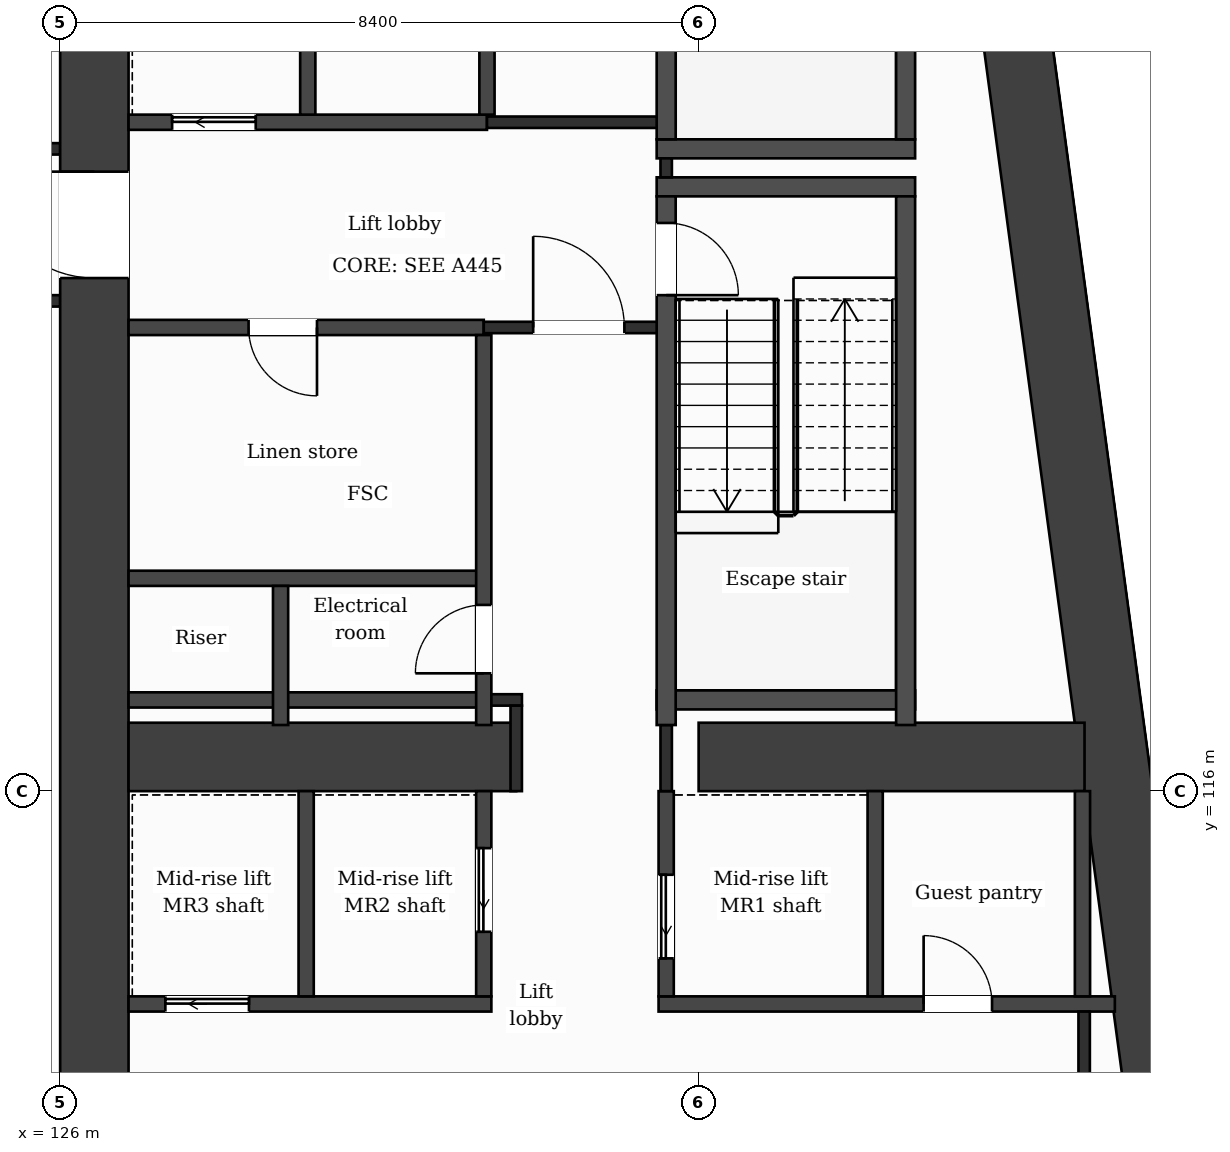
"""IFC4 building model, lengths in metres.
Left out: names, types, materials, properties, quantities, classifications, styles, units other than length and angle.
Written with IfcOpenShell. Run it as: python <this file> out.ifc"""

import sys

from ifc_helpers import new_model, si_unit, direction, frame, frame_2d, origin, place, context, subcontext, project, spatial, rectangle, extrude, element, fill, save


model = new_model("IFC4")
c1 = context("Model", 3, precision=1e-05, world=origin(), true_north=direction((0.0, 1.0)))
c2 = subcontext(c1, "Body", "Model", "MODEL_VIEW")
j1 = project(units=[si_unit("LENGTHUNIT", "METRE"), si_unit("PLANEANGLEUNIT", "RADIAN")], contexts=[c1])
p1 = place(None, origin())
s1 = spatial("IfcSite", under=j1, at=p1, CompositionType="ELEMENT")
p2 = place(p1, origin())
s2 = spatial("IfcBuilding", under=s1, at=p2, CompositionType="ELEMENT")
p3 = place(p2, frame((0.0, 0.0, 184.8)))
s3 = spatial("IfcBuildingStorey", under=s2, at=p3, CompositionType="ELEMENT", Elevation=184.8)
p4 = place(p3, frame((137.776, 131.95, 0.0), z_axis=(0.0, 0.0, 1.0), x_axis=(0.133421759112, -0.991059349482, 0.0)))
e1 = element("IfcWall", 1, at=p4, inside=s3, PredefinedType="SHEAR", context=c2, shape_type="SweptSolid", body=[
    extrude(rectangle(XDim=21.29, YDim=0.9, at=frame_2d((10.645, 0.0))), origin(), (0.0, 0.0, 1.0), 3.7),
])
p5 = place(p3, frame((126.45, 110.85, 0.0), z_axis=(0.0, 0.0, 1.0), x_axis=(0.0, 1.0, 0.0)))
e2 = element("IfcWall", 2, at=p5, inside=s3, PredefinedType="SHEAR", context=c2, shape_type="SweptSolid", body=[
    extrude(rectangle(XDim=21.1, YDim=0.9, at=frame_2d((10.55, 0.0))), origin(), (0.0, 0.0, 1.0), 3.7),
])
p6 = place(p5, frame((11.9, 0.0, 0.0)))
e3 = element("IfcOpeningElement", 3, at=p6, cuts=e2, PredefinedType="OPENING", context=c2, shape_type="SweptSolid", body=[
    extrude(rectangle(XDim=1.4, YDim=2.1, at=frame_2d((0.7, 1.05))), frame((0.0, 0.46, 0.0), z_axis=(0.0, -1.0, 0.0), x_axis=(1.0, 0.0, 0.0)), (0.0, 0.0, 1.0), 0.92),
])
p7 = place(p3, frame((126.9, 116.45, 0.0), z_axis=(0.0, 0.0, 1.0), x_axis=(1.0, 0.0, 0.0)))
e4 = element("IfcWall", 4, at=p7, inside=s3, PredefinedType="SHEAR", context=c2, shape_type="SweptSolid", body=[
    extrude(rectangle(XDim=5.1, YDim=0.9, at=frame_2d((2.55, 0.0))), origin(), (0.0, 0.0, 1.0), 3.7),
])
p8 = place(p3, frame((134.4, 116.45, 0.0), z_axis=(0.0, 0.0, 1.0), x_axis=(1.0, 0.0, 0.0)))
e5 = element("IfcWall", 5, at=p8, inside=s3, PredefinedType="SHEAR", context=c2, shape_type="SweptSolid", body=[
    extrude(rectangle(XDim=5.077, YDim=0.9, at=frame_2d((2.539, 0.0))), origin(), (0.0, 0.0, 1.0), 3.7),
])
p9 = place(p3, frame((126.9, 113.2, 0.0), z_axis=(0.0, 0.0, 1.0), x_axis=(1.0, 0.0, 0.0)))
e6 = element("IfcWall", 6, at=p9, inside=s3, PredefinedType="PARTITIONING", context=c2, shape_type="SweptSolid", body=[
    extrude(rectangle(XDim=4.773, YDim=0.2, at=frame_2d((2.387, 0.0))), origin(), (0.0, 0.0, 1.0), 3.38),
])
p10 = place(p9, frame((0.484, 0.0, 0.0)))
e7 = element("IfcOpeningElement", 7, at=p10, cuts=e6, PredefinedType="OPENING", context=c2, shape_type="SweptSolid", body=[
    extrude(rectangle(XDim=1.1, YDim=2.1, at=frame_2d((0.55, 1.05))), frame((0.0, 0.11, 0.0), z_axis=(0.0, -1.0, 0.0), x_axis=(1.0, 0.0, 0.0)), (0.0, 0.0, 1.0), 0.22),
])
p11 = place(p3, frame((133.873, 113.2, 0.0), z_axis=(0.0, 0.0, 1.0), x_axis=(1.0, 0.0, 0.0)))
e8 = element("IfcWall", 8, at=p11, inside=s3, PredefinedType="PARTITIONING", context=c2, shape_type="SweptSolid", body=[
    extrude(rectangle(XDim=6.003, YDim=0.2, at=frame_2d((3.001, 0.0))), origin(), (0.0, 0.0, 1.0), 3.38),
])
p12 = place(p11, frame((3.487, 0.0, 0.0)))
e9 = element("IfcOpeningElement", 9, at=p12, cuts=e8, PredefinedType="OPENING", context=c2, shape_type="SweptSolid", body=[
    extrude(rectangle(XDim=0.9, YDim=2.1, at=frame_2d((0.45, 1.05))), frame((0.0, 0.11, 0.0), z_axis=(0.0, -1.0, 0.0), x_axis=(1.0, 0.0, 0.0)), (0.0, 0.0, 1.0), 0.22),
])
p13 = place(p3, frame((126.9, 117.2, 0.0), z_axis=(0.0, 0.0, 1.0), x_axis=(1.0, 0.0, 0.0)))
e10 = element("IfcWall", 10, at=p13, inside=s3, PredefinedType="PARTITIONING", context=c2, shape_type="SweptSolid", body=[
    extrude(rectangle(XDim=4.673, YDim=0.2, at=frame_2d((2.336, 0.0))), origin(), (0.0, 0.0, 1.0), 3.38),
])
p14 = place(p3, frame((131.573, 117.2, 0.0), z_axis=(0.0, 0.0, 1.0), x_axis=(1.0, 0.0, 0.0)))
e11 = element("IfcWall", 11, at=p14, inside=s3, PredefinedType="PARTITIONING", context=c2, shape_type="SweptSolid", body=[
    extrude(rectangle(XDim=0.502, YDim=0.15, at=frame_2d((0.251, 0.0))), origin(), (0.0, 0.0, 1.0), 3.38),
])
p15 = place(p3, frame((133.848, 117.2, 0.0), z_axis=(0.0, 0.0, 1.0), x_axis=(1.0, 0.0, 0.0)))
e12 = element("IfcWall", 12, at=p15, inside=s3, PredefinedType="PARTITIONING", context=c2, shape_type="SweptSolid", body=[
    extrude(rectangle(XDim=3.4, YDim=0.25, at=frame_2d((1.7, 0.0))), origin(), (0.0, 0.0, 1.0), 3.38),
])
p16 = place(p3, frame((126.9, 118.8, 0.0), z_axis=(0.0, 0.0, 1.0), x_axis=(1.0, 0.0, 0.0)))
e13 = element("IfcWall", 13, at=p16, inside=s3, PredefinedType="PARTITIONING", context=c2, shape_type="SweptSolid", body=[
    extrude(rectangle(XDim=4.673, YDim=0.2, at=frame_2d((2.336, 0.0))), origin(), (0.0, 0.0, 1.0), 3.38),
])
p17 = place(p3, frame((126.9, 122.1, 0.0), z_axis=(0.0, 0.0, 1.0), x_axis=(1.0, 0.0, 0.0)))
e14 = element("IfcWall", 14, at=p17, inside=s3, PredefinedType="PARTITIONING", context=c2, shape_type="SweptSolid", body=[
    extrude(rectangle(XDim=4.673, YDim=0.2, at=frame_2d((2.336, 0.0))), origin(), (0.0, 0.0, 1.0), 3.38),
])
p18 = place(p17, frame((1.579, 0.0, 0.0)))
e15 = element("IfcOpeningElement", 15, at=p18, cuts=e14, PredefinedType="OPENING", context=c2, shape_type="SweptSolid", body=[
    extrude(rectangle(XDim=0.9, YDim=2.1, at=frame_2d((0.45, 1.05))), frame((0.0, 0.11, 0.0), z_axis=(0.0, -1.0, 0.0), x_axis=(1.0, 0.0, 0.0)), (0.0, 0.0, 1.0), 0.22),
])
p19 = place(p3, frame((131.573, 122.1, 0.0), z_axis=(0.0, 0.0, 1.0), x_axis=(1.0, 0.0, 0.0)))
e16 = element("IfcWall", 16, at=p19, inside=s3, PredefinedType="PARTITIONING", context=c2, shape_type="SweptSolid", body=[
    extrude(rectangle(XDim=2.4, YDim=0.15, at=frame_2d((1.2, 0.0))), origin(), (0.0, 0.0, 1.0), 3.38),
])
p20 = place(p19, frame((0.65, 0.0, 0.0)))
e17 = element("IfcOpeningElement", 17, at=p20, cuts=e16, PredefinedType="OPENING", context=c2, shape_type="SweptSolid", body=[
    extrude(rectangle(XDim=1.2, YDim=2.1, at=frame_2d((0.6, 1.05))), frame((0.0, 0.085, 0.0), z_axis=(0.0, -1.0, 0.0), x_axis=(1.0, 0.0, 0.0)), (0.0, 0.0, 1.0), 0.17),
])
p21 = place(p3, frame((100.8, 122.45, 0.0), z_axis=(0.0, 0.0, 1.0), x_axis=(1.0, 0.0, 0.0)))
e18 = element("IfcWall", 18, at=p21, inside=s3, PredefinedType="PARTITIONING", context=c2, shape_type="SweptSolid", body=[
    extrude(rectangle(XDim=25.2, YDim=0.15, at=frame_2d((12.6, 0.0))), origin(), (0.0, 0.0, 1.0), 3.38),
])
for number, where, z_axis, x_axis in (
    (19, (133.848, 123.95, 0.0), (0.0, 0.0, 1.0), (1.0, 0.0, 0.0)),
    (20, (133.848, 124.45, 0.0), (0.0, 0.0, 1.0), (1.0, 0.0, 0.0)),
):
    element("IfcWall", number, at=place(p3, frame(where, z_axis=z_axis, x_axis=x_axis)), inside=s3, PredefinedType="PARTITIONING", context=c2, shape_type="SweptSolid", body=[
        extrude(rectangle(XDim=3.4, YDim=0.25, at=frame_2d((1.7, 0.0))), origin(), (0.0, 0.0, 1.0), 3.38),
    ])
p22 = place(p3, frame((100.8, 124.45, 0.0), z_axis=(0.0, 0.0, 1.0), x_axis=(1.0, 0.0, 0.0)))
e21 = element("IfcWall", 21, at=p22, inside=s3, PredefinedType="PARTITIONING", context=c2, shape_type="SweptSolid", body=[
    extrude(rectangle(XDim=25.2, YDim=0.15, at=frame_2d((12.6, 0.0))), origin(), (0.0, 0.0, 1.0), 3.38),
])
p23 = place(p22, frame((0.675, 0.0, 0.0)))
e22 = element("IfcOpeningElement", 22, at=p23, cuts=e21, PredefinedType="OPENING", context=c2, shape_type="SweptSolid", body=[
    extrude(rectangle(XDim=1.0, YDim=2.1, at=frame_2d((0.5, 1.05))), frame((0.0, 0.085, 0.0), z_axis=(0.0, -1.0, 0.0), x_axis=(1.0, 0.0, 0.0)), (0.0, 0.0, 1.0), 0.17),
])
p24 = place(p22, frame((5.175, 0.0, 0.0)))
e23 = element("IfcOpeningElement", 23, at=p24, cuts=e21, PredefinedType="OPENING", context=c2, shape_type="SweptSolid", body=[
    extrude(rectangle(XDim=1.0, YDim=2.1, at=frame_2d((0.5, 1.05))), frame((0.0, 0.085, 0.0), z_axis=(0.0, -1.0, 0.0), x_axis=(1.0, 0.0, 0.0)), (0.0, 0.0, 1.0), 0.17),
])
p25 = place(p22, frame((10.425, 0.0, 0.0)))
e24 = element("IfcOpeningElement", 24, at=p25, cuts=e21, PredefinedType="OPENING", context=c2, shape_type="SweptSolid", body=[
    extrude(rectangle(XDim=1.0, YDim=2.1, at=frame_2d((0.5, 1.05))), frame((0.0, 0.085, 0.0), z_axis=(0.0, -1.0, 0.0), x_axis=(1.0, 0.0, 0.0)), (0.0, 0.0, 1.0), 0.17),
])
p26 = place(p22, frame((22.175, 0.0, 0.0)))
e25 = element("IfcOpeningElement", 25, at=p26, cuts=e21, PredefinedType="OPENING", context=c2, shape_type="SweptSolid", body=[
    extrude(rectangle(XDim=1.0, YDim=2.1, at=frame_2d((0.5, 1.05))), frame((0.0, 0.085, 0.0), z_axis=(0.0, -1.0, 0.0), x_axis=(1.0, 0.0, 0.0)), (0.0, 0.0, 1.0), 0.17),
])
p27 = place(p3, frame((126.9, 124.8, 0.0), z_axis=(0.0, 0.0, 1.0), x_axis=(1.0, 0.0, 0.0)))
e26 = element("IfcWall", 26, at=p27, inside=s3, PredefinedType="PARTITIONING", context=c2, shape_type="SweptSolid", body=[
    extrude(rectangle(XDim=4.715, YDim=0.2, at=frame_2d((2.358, 0.0))), origin(), (0.0, 0.0, 1.0), 3.38),
])
p28 = place(p27, frame((0.573, 0.0, 0.0)))
e27 = element("IfcOpeningElement", 27, at=p28, cuts=e26, PredefinedType="OPENING", context=c2, shape_type="SweptSolid", body=[
    extrude(rectangle(XDim=1.1, YDim=2.1, at=frame_2d((0.55, 1.05))), frame((0.0, 0.11, 0.0), z_axis=(0.0, -1.0, 0.0), x_axis=(1.0, 0.0, 0.0)), (0.0, 0.0, 1.0), 0.22),
])
p29 = place(p3, frame((131.615, 124.8, 0.0), z_axis=(0.0, 0.0, 1.0), x_axis=(1.0, 0.0, 0.0)))
e28 = element("IfcWall", 28, at=p29, inside=s3, PredefinedType="PARTITIONING", context=c2, shape_type="SweptSolid", body=[
    extrude(rectangle(XDim=2.483, YDim=0.15, at=frame_2d((1.241, 0.0))), origin(), (0.0, 0.0, 1.0), 3.38),
])
p30 = place(p3, frame((128.9, 116.87, 0.0), z_axis=(0.0, 0.0, 1.0), x_axis=(0.0, 1.0, 0.0)))
e29 = element("IfcWall", 29, at=p30, inside=s3, PredefinedType="PARTITIONING", context=c2, shape_type="SweptSolid", body=[
    extrude(rectangle(XDim=1.83, YDim=0.2, at=frame_2d((0.915, 0.0))), origin(), (0.0, 0.0, 1.0), 3.38),
])
p31 = place(p3, frame((129.237, 113.3, 0.0), z_axis=(0.0, 0.0, 1.0), x_axis=(0.0, 1.0, 0.0)))
e30 = element("IfcWall", 30, at=p31, inside=s3, PredefinedType="PARTITIONING", context=c2, shape_type="SweptSolid", body=[
    extrude(rectangle(XDim=2.7, YDim=0.2, at=frame_2d((1.35, 0.0))), origin(), (0.0, 0.0, 1.0), 3.38),
])
p32 = place(p3, frame((129.258, 124.9, 0.0), z_axis=(0.0, 0.0, 1.0), x_axis=(0.0, 1.0, 0.0)))
e31 = element("IfcWall", 31, at=p32, inside=s3, PredefinedType="PARTITIONING", context=c2, shape_type="SweptSolid", body=[
    extrude(rectangle(XDim=3.1, YDim=0.2, at=frame_2d((1.55, 0.0))), origin(), (0.0, 0.0, 1.0), 3.38),
])
p33 = place(p3, frame((131.573, 113.3, 0.0), z_axis=(0.0, 0.0, 1.0), x_axis=(0.0, 1.0, 0.0)))
e32 = element("IfcWall", 32, at=p33, inside=s3, PredefinedType="PARTITIONING", context=c2, shape_type="SweptSolid", body=[
    extrude(rectangle(XDim=2.7, YDim=0.2, at=frame_2d((1.35, 0.0))), origin(), (0.0, 0.0, 1.0), 3.38),
])
p34 = place(p33, frame((0.85, 0.0, 0.0)))
e33 = element("IfcOpeningElement", 33, at=p34, cuts=e32, PredefinedType="OPENING", context=c2, shape_type="SweptSolid", body=[
    extrude(rectangle(XDim=1.1, YDim=2.1, at=frame_2d((0.55, 1.05))), frame((0.0, 0.11, 0.0), z_axis=(0.0, -1.0, 0.0), x_axis=(1.0, 0.0, 0.0)), (0.0, 0.0, 1.0), 0.22),
])
p35 = place(p3, frame((131.573, 116.87, 0.0), z_axis=(0.0, 0.0, 1.0), x_axis=(0.0, 1.0, 0.0)))
e34 = element("IfcWall", 34, at=p35, inside=s3, PredefinedType="PARTITIONING", context=c2, shape_type="SweptSolid", body=[
    extrude(rectangle(XDim=5.13, YDim=0.2, at=frame_2d((2.565, 0.0))), origin(), (0.0, 0.0, 1.0), 3.38),
])
p36 = place(p35, frame((0.68, 0.0, 0.0)))
e35 = element("IfcOpeningElement", 35, at=p36, cuts=e34, PredefinedType="OPENING", context=c2, shape_type="SweptSolid", body=[
    extrude(rectangle(XDim=0.9, YDim=2.1, at=frame_2d((0.45, 1.05))), frame((0.0, 0.11, 0.0), z_axis=(0.0, -1.0, 0.0), x_axis=(1.0, 0.0, 0.0)), (0.0, 0.0, 1.0), 0.22),
])
p37 = place(p3, frame((131.615, 124.9, 0.0), z_axis=(0.0, 0.0, 1.0), x_axis=(0.0, 1.0, 0.0)))
e36 = element("IfcWall", 36, at=p37, inside=s3, PredefinedType="PARTITIONING", context=c2, shape_type="SweptSolid", body=[
    extrude(rectangle(XDim=3.1, YDim=0.2, at=frame_2d((1.55, 0.0))), origin(), (0.0, 0.0, 1.0), 3.38),
])
p38 = place(p3, frame((132.0, 116.0, 0.0), z_axis=(0.0, 0.0, 1.0), x_axis=(0.0, 1.0, 0.0)))
e37 = element("IfcWall", 37, at=p38, inside=s3, PredefinedType="PARTITIONING", context=c2, shape_type="SweptSolid", body=[
    extrude(rectangle(XDim=1.125, YDim=0.15, at=frame_2d((0.562, 0.0))), origin(), (0.0, 0.0, 1.0), 3.38),
])
p39 = place(p3, frame((133.973, 113.3, 0.0), z_axis=(0.0, 0.0, 1.0), x_axis=(0.0, 1.0, 0.0)))
e38 = element("IfcWall", 38, at=p39, inside=s3, PredefinedType="PARTITIONING", context=c2, shape_type="SweptSolid", body=[
    extrude(rectangle(XDim=2.7, YDim=0.2, at=frame_2d((1.35, 0.0))), origin(), (0.0, 0.0, 1.0), 3.38),
])
p40 = place(p39, frame((0.5, 0.0, 0.0)))
e39 = element("IfcOpeningElement", 39, at=p40, cuts=e38, PredefinedType="OPENING", context=c2, shape_type="SweptSolid", body=[
    extrude(rectangle(XDim=1.1, YDim=2.1, at=frame_2d((0.55, 1.05))), frame((0.0, 0.11, 0.0), z_axis=(0.0, -1.0, 0.0), x_axis=(1.0, 0.0, 0.0)), (0.0, 0.0, 1.0), 0.22),
])
p41 = place(p3, frame((133.973, 116.0, 0.0), z_axis=(0.0, 0.0, 1.0), x_axis=(0.0, 1.0, 0.0)))
e40 = element("IfcWall", 40, at=p41, inside=s3, PredefinedType="PARTITIONING", context=c2, shape_type="SweptSolid", body=[
    extrude(rectangle(XDim=0.87, YDim=0.15, at=frame_2d((0.435, 0.0))), origin(), (0.0, 0.0, 1.0), 3.38),
])
p42 = place(p3, frame((133.973, 124.075, 0.0), z_axis=(0.0, 0.0, 1.0), x_axis=(0.0, 1.0, 0.0)))
e41 = element("IfcWall", 41, at=p42, inside=s3, PredefinedType="PARTITIONING", context=c2, shape_type="SweptSolid", body=[
    extrude(rectangle(XDim=0.25, YDim=0.15, at=frame_2d((0.125, 0.0))), origin(), (0.0, 0.0, 1.0), 3.38),
])
p43 = place(p3, frame((133.973, 116.87, 0.0), z_axis=(0.0, 0.0, 1.0), x_axis=(0.0, 1.0, 0.0)))
e42 = element("IfcWall", 42, at=p43, inside=s3, PredefinedType="PARTITIONING", context=c2, shape_type="SweptSolid", body=[
    extrude(rectangle(XDim=6.955, YDim=0.25, at=frame_2d((3.478, 0.0))), origin(), (0.0, 0.0, 1.0), 3.38),
])
p44 = place(p43, frame((5.655, 0.0, 0.0)))
e43 = element("IfcOpeningElement", 43, at=p44, cuts=e42, PredefinedType="OPENING", context=c2, shape_type="SweptSolid", body=[
    extrude(rectangle(XDim=0.95, YDim=2.1, at=frame_2d((0.475, 1.05))), frame((0.0, 0.135, 0.0), z_axis=(0.0, -1.0, 0.0), x_axis=(1.0, 0.0, 0.0)), (0.0, 0.0, 1.0), 0.27),
])
p45 = place(p3, frame((133.973, 124.575, 0.0), z_axis=(0.0, 0.0, 1.0), x_axis=(0.0, 1.0, 0.0)))
e44 = element("IfcWall", 44, at=p45, inside=s3, PredefinedType="PARTITIONING", context=c2, shape_type="SweptSolid", body=[
    extrude(rectangle(XDim=6.955, YDim=0.25, at=frame_2d((3.478, 0.0))), origin(), (0.0, 0.0, 1.0), 3.38),
])
p46 = place(p45, frame((5.325, 0.0, 0.0)))
e45 = element("IfcOpeningElement", 45, at=p46, cuts=e44, PredefinedType="OPENING", context=c2, shape_type="SweptSolid", body=[
    extrude(rectangle(XDim=1.0, YDim=2.1, at=frame_2d((0.5, 1.05))), frame((0.0, 0.135, 0.0), z_axis=(0.0, -1.0, 0.0), x_axis=(1.0, 0.0, 0.0)), (0.0, 0.0, 1.0), 0.27),
])
p47 = place(p3, frame((136.722, 113.3, 0.0), z_axis=(0.0, 0.0, 1.0), x_axis=(0.0, 1.0, 0.0)))
e46 = element("IfcWall", 46, at=p47, inside=s3, PredefinedType="PARTITIONING", context=c2, shape_type="SweptSolid", body=[
    extrude(rectangle(XDim=2.7, YDim=0.2, at=frame_2d((1.35, 0.0))), origin(), (0.0, 0.0, 1.0), 3.38),
])
p48 = place(p3, frame((137.123, 116.87, 0.0), z_axis=(0.0, 0.0, 1.0), x_axis=(0.0, 1.0, 0.0)))
e47 = element("IfcWall", 47, at=p48, inside=s3, PredefinedType="PARTITIONING", context=c2, shape_type="SweptSolid", body=[
    extrude(rectangle(XDim=6.955, YDim=0.25, at=frame_2d((3.478, 0.0))), origin(), (0.0, 0.0, 1.0), 3.38),
])
p49 = place(p3, frame((137.123, 124.575, 0.0), z_axis=(0.0, 0.0, 1.0), x_axis=(0.0, 1.0, 0.0)))
e48 = element("IfcWall", 48, at=p49, inside=s3, PredefinedType="PARTITIONING", context=c2, shape_type="SweptSolid", body=[
    extrude(rectangle(XDim=6.955, YDim=0.25, at=frame_2d((3.478, 0.0))), origin(), (0.0, 0.0, 1.0), 3.38),
])
p50 = place(p3, frame((139.45, 113.3, 0.0), z_axis=(0.0, 0.0, 1.0), x_axis=(0.0, 1.0, 0.0)))
e49 = element("IfcWall", 49, at=p50, inside=s3, PredefinedType="PARTITIONING", context=c2, shape_type="SweptSolid", body=[
    extrude(rectangle(XDim=2.7, YDim=0.2, at=frame_2d((1.35, 0.0))), origin(), (0.0, 0.0, 1.0), 3.38),
])
p51 = place(p3, frame((139.472, 111.3, 0.0), z_axis=(0.0, 0.0, 1.0), x_axis=(0.0, 1.0, 0.0)))
e50 = element("IfcWall", 50, at=p51, inside=s3, PredefinedType="PARTITIONING", context=c2, shape_type="SweptSolid", body=[
    extrude(rectangle(XDim=1.8, YDim=0.15, at=frame_2d((0.9, 0.0))), origin(), (0.0, 0.0, 1.0), 3.38),
])
p52 = place(p20, origin())
e51 = element("IfcDoor", 51, at=p52, inside=s3, OperationType="SINGLE_SWING_LEFT", PredefinedType="DOOR", context=c2, shape_type="SweptSolid", body=[
    extrude(rectangle(XDim=1.2, YDim=2.1, at=frame_2d((0.6, 1.05))), frame((0.0, 0.025, 0.0), z_axis=(0.0, -1.0, 0.0), x_axis=(1.0, 0.0, 0.0)), (0.0, 0.0, 1.0), 0.05),
])
fill(e17, e51)
p53 = place(p28, origin())
e52 = element("IfcDoor", 52, at=p53, inside=s3, OperationType="SLIDING_TO_LEFT", PredefinedType="DOOR", context=c2, shape_type="SweptSolid", body=[
    extrude(rectangle(XDim=1.1, YDim=2.1, at=frame_2d((0.55, 1.05))), frame((0.0, 0.025, 0.0), z_axis=(0.0, -1.0, 0.0), x_axis=(1.0, 0.0, 0.0)), (0.0, 0.0, 1.0), 0.05),
])
fill(e27, e52)
p54 = place(p18, origin())
e53 = element("IfcDoor", 53, at=p54, inside=s3, OperationType="SINGLE_SWING_RIGHT", PredefinedType="DOOR", context=c2, shape_type="SweptSolid", body=[
    extrude(rectangle(XDim=0.9, YDim=2.1, at=frame_2d((0.45, 1.05))), frame((0.0, 0.025, 0.0), z_axis=(0.0, -1.0, 0.0), x_axis=(1.0, 0.0, 0.0)), (0.0, 0.0, 1.0), 0.05),
])
fill(e15, e53)
p55 = place(p44, origin())
e54 = element("IfcDoor", 54, at=p55, inside=s3, OperationType="SINGLE_SWING_LEFT", PredefinedType="DOOR", context=c2, shape_type="SweptSolid", body=[
    extrude(rectangle(XDim=0.95, YDim=2.1, at=frame_2d((0.475, 1.05))), frame((0.0, 0.025, 0.0), z_axis=(0.0, -1.0, 0.0), x_axis=(1.0, 0.0, 0.0)), (0.0, 0.0, 1.0), 0.05),
])
fill(e43, e54)
p56 = place(p36, origin())
e55 = element("IfcDoor", 55, at=p56, inside=s3, OperationType="SINGLE_SWING_LEFT", PredefinedType="DOOR", context=c2, shape_type="SweptSolid", body=[
    extrude(rectangle(XDim=0.9, YDim=2.1, at=frame_2d((0.45, 1.05))), frame((0.0, 0.025, 0.0), z_axis=(0.0, -1.0, 0.0), x_axis=(1.0, 0.0, 0.0)), (0.0, 0.0, 1.0), 0.05),
])
fill(e35, e55)
p57 = place(p40, origin())
e56 = element("IfcDoor", 56, at=p57, inside=s3, OperationType="SLIDING_TO_LEFT", PredefinedType="DOOR", context=c2, shape_type="SweptSolid", body=[
    extrude(rectangle(XDim=1.1, YDim=2.1, at=frame_2d((0.55, 1.05))), frame((0.0, 0.025, 0.0), z_axis=(0.0, -1.0, 0.0), x_axis=(1.0, 0.0, 0.0)), (0.0, 0.0, 1.0), 0.05),
])
fill(e39, e56)
p58 = place(p34, origin())
e57 = element("IfcDoor", 57, at=p58, inside=s3, OperationType="SLIDING_TO_LEFT", PredefinedType="DOOR", context=c2, shape_type="SweptSolid", body=[
    extrude(rectangle(XDim=1.1, YDim=2.1, at=frame_2d((0.55, 1.05))), frame((0.0, 0.025, 0.0), z_axis=(0.0, -1.0, 0.0), x_axis=(1.0, 0.0, 0.0)), (0.0, 0.0, 1.0), 0.05),
])
fill(e33, e57)
p59 = place(p10, origin())
e58 = element("IfcDoor", 58, at=p59, inside=s3, OperationType="SLIDING_TO_LEFT", PredefinedType="DOOR", context=c2, shape_type="SweptSolid", body=[
    extrude(rectangle(XDim=1.1, YDim=2.1, at=frame_2d((0.55, 1.05))), frame((0.0, 0.025, 0.0), z_axis=(0.0, -1.0, 0.0), x_axis=(1.0, 0.0, 0.0)), (0.0, 0.0, 1.0), 0.05),
])
fill(e7, e58)
p60 = place(p12, origin())
e59 = element("IfcDoor", 59, at=p60, inside=s3, OperationType="SINGLE_SWING_LEFT", PredefinedType="DOOR", context=c2, shape_type="SweptSolid", body=[
    extrude(rectangle(XDim=0.9, YDim=2.1, at=frame_2d((0.45, 1.05))), frame((0.0, 0.025, 0.0), z_axis=(0.0, -1.0, 0.0), x_axis=(1.0, 0.0, 0.0)), (0.0, 0.0, 1.0), 0.05),
])
fill(e9, e59)
p61 = place(p6, origin())
e60 = element("IfcDoor", 60, at=p61, inside=s3, OperationType="SINGLE_SWING_RIGHT", PredefinedType="DOOR", context=c2, shape_type="SweptSolid", body=[
    extrude(rectangle(XDim=1.4, YDim=2.1, at=frame_2d((0.7, 1.05))), frame((0.0, 0.025, 0.0), z_axis=(0.0, -1.0, 0.0), x_axis=(1.0, 0.0, 0.0)), (0.0, 0.0, 1.0), 0.05),
])
fill(e3, e60)
save(model, sys.argv[1])
